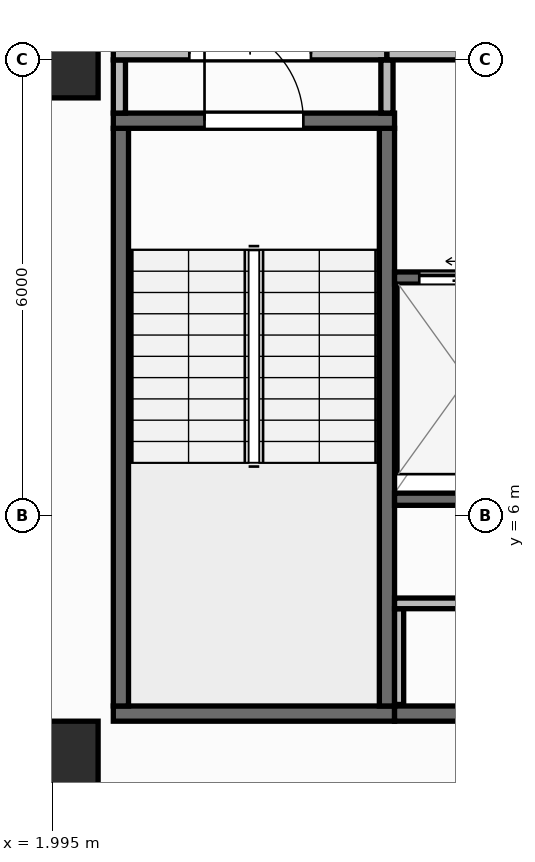
"""IFC4 building model, lengths in metres.
Left out: names, types, materials, properties, quantities, classifications, styles, units other than length and angle.
Written with IfcOpenShell. Run it as: python <this file> out.ifc"""

import sys

from ifc_helpers import new_model, si_unit, direction, frame, frame_2d, origin, origin_2d, place, context, subcontext, project, spatial, rectangle, extrude, element, fill, save


model = new_model("IFC4")
c1 = context("Model", 3, precision=1e-05, world=origin(), true_north=direction((0.0, 1.0)))
c2 = subcontext(c1, "Body", "Model", "MODEL_VIEW")
j1 = project(units=[si_unit("LENGTHUNIT", "METRE"), si_unit("PLANEANGLEUNIT", "RADIAN")], contexts=[c1])
p1 = place(None, origin())
s1 = spatial("IfcSite", under=j1, at=p1, CompositionType="ELEMENT")
p2 = place(p1, origin())
s2 = spatial("IfcBuilding", under=s1, at=p2, CompositionType="ELEMENT")
p3 = place(p2, frame((0.0, 0.0, 188.15)))
s3 = spatial("IfcBuildingStorey", under=s2, at=p3, CompositionType="ELEMENT", Elevation=188.15)
for number, where, z_axis, x_axis in (
    (1, (2.1, 2.8, 0.0), (0.0, 0.0, 1.0), (1.0, 0.0, 0.0)),
    (2, (2.1, 12.0, 0.0), (0.0, 0.0, 1.0), (1.0, 0.0, 0.0)),
):
    element("IfcColumn", number, at=place(p3, frame(where, z_axis=z_axis, x_axis=x_axis)), inside=s3, PredefinedType="COLUMN", context=c2, shape_type="SweptSolid", body=[
        extrude(rectangle(XDim=1.0, YDim=1.0, at=origin_2d()), origin(), (0.0, 0.0, 1.0), 3.95),
    ])
p4 = place(p3, frame((2.66, 0.174, 0.0), z_axis=(0.0, 0.0, 1.0), x_axis=(0.996634028439, 0.081979347142, 0.0)))
e3 = element("IfcWall", 3, at=p4, inside=s3, PredefinedType="STANDARD", context=c2, shape_type="SweptSolid", body=[
    extrude(rectangle(XDim=46.035, YDim=0.26, at=frame_2d((23.018, 0.0))), origin(), (0.0, 0.0, 1.0), 3.71),
])
p5 = place(p4, frame((21.817, 0.0, 0.9)))
e4 = element("IfcOpeningElement", 4, at=p5, cuts=e3, PredefinedType="OPENING", context=c2, shape_type="SweptSolid", body=[
    extrude(rectangle(XDim=2.4, YDim=1.65, at=frame_2d((1.2, 0.825))), frame((0.0, 0.14, 0.0), z_axis=(0.0, -1.0, 0.0), x_axis=(1.0, 0.0, 0.0)), (0.0, 0.0, 1.0), 0.28),
])
p6 = place(p3, frame((2.8, 3.4, 0.0), z_axis=(0.0, 0.0, 1.0), x_axis=(1.0, 0.0, 0.0)))
e5 = element("IfcWall", 5, at=p6, inside=s3, PredefinedType="SHEAR", context=c2, shape_type="SweptSolid", body=[
    extrude(rectangle(XDim=3.7, YDim=0.2, at=frame_2d((1.85, 0.0))), origin(), (0.0, 0.0, 1.0), 3.71),
])
for number, where, z_axis, x_axis in (
    (6, (2.9, 3.5, 0.0), (0.0, 0.0, 1.0), (0.0, 1.0, 0.0)),
    (7, (6.4, 3.5, 0.0), (0.0, 0.0, 1.0), (0.0, 1.0, 0.0)),
):
    element("IfcWall", number, at=place(p3, frame(where, z_axis=z_axis, x_axis=x_axis)), inside=s3, PredefinedType="SHEAR", context=c2, shape_type="SweptSolid", body=[
        extrude(rectangle(XDim=7.6, YDim=0.2, at=frame_2d((3.8, 0.0))), origin(), (0.0, 0.0, 1.0), 3.71),
    ])
p7 = place(p3, frame((2.8, 11.2, 0.0), z_axis=(0.0, 0.0, 1.0), x_axis=(1.0, 0.0, 0.0)))
e8 = element("IfcWall", 8, at=p7, inside=s3, PredefinedType="SHEAR", context=c2, shape_type="SweptSolid", body=[
    extrude(rectangle(XDim=3.7, YDim=0.2, at=frame_2d((1.85, 0.0))), origin(), (0.0, 0.0, 1.0), 3.71),
])
p8 = place(p7, frame((1.2, 0.0, 0.0)))
e9 = element("IfcOpeningElement", 9, at=p8, cuts=e8, PredefinedType="OPENING", context=c2, shape_type="SweptSolid", body=[
    extrude(rectangle(XDim=1.3, YDim=2.15, at=frame_2d((0.65, 1.075))), frame((0.0, 0.11, 0.0), z_axis=(0.0, -1.0, 0.0), x_axis=(1.0, 0.0, 0.0)), (0.0, 0.0, 1.0), 0.22),
])
p9 = place(p3, frame((6.5, 3.4, 0.0), z_axis=(0.0, 0.0, 1.0), x_axis=(1.0, 0.0, 0.0)))
e10 = element("IfcWall", 10, at=p9, inside=s3, PredefinedType="SHEAR", context=c2, shape_type="SweptSolid", body=[
    extrude(rectangle(XDim=13.7, YDim=0.2, at=frame_2d((6.85, 0.0))), origin(), (0.0, 0.0, 1.0), 3.71),
])
p10 = place(p3, frame((6.5, 6.22, 0.0), z_axis=(0.0, 0.0, 1.0), x_axis=(1.0, 0.0, 0.0)))
e11 = element("IfcWall", 11, at=p10, inside=s3, PredefinedType="SHEAR", context=c2, shape_type="SweptSolid", body=[
    extrude(rectangle(XDim=12.11, YDim=0.16, at=frame_2d((6.055, 0.0))), origin(), (0.0, 0.0, 1.0), 3.71),
])
p11 = place(p3, frame((6.5, 9.13, 0.0), z_axis=(0.0, 0.0, 1.0), x_axis=(1.0, 0.0, 0.0)))
e12 = element("IfcWall", 12, at=p11, inside=s3, PredefinedType="SHEAR", context=c2, shape_type="SweptSolid", body=[
    extrude(rectangle(XDim=1.975, YDim=0.16, at=frame_2d((0.988, 0.0))), origin(), (0.0, 0.0, 1.0), 3.71),
])
p12 = place(p11, frame((0.325, 0.0, 0.0)))
e13 = element("IfcOpeningElement", 13, at=p12, cuts=e12, PredefinedType="OPENING", context=c2, shape_type="SweptSolid", body=[
    extrude(rectangle(XDim=1.25, YDim=2.15, at=frame_2d((0.625, 1.075))), frame((0.0, 0.09, 0.0), z_axis=(0.0, -1.0, 0.0), x_axis=(1.0, 0.0, 0.0)), (0.0, 0.0, 1.0), 0.18),
])
p13 = place(p3, frame((6.56, 3.52, 0.0), z_axis=(0.0, 0.0, 1.0), x_axis=(0.0, 1.0, 0.0)))
e14 = element("IfcWall", 14, at=p13, inside=s3, PredefinedType="PARTITIONING", context=c2, shape_type="SweptSolid", body=[
    extrude(rectangle(XDim=1.26, YDim=0.12, at=frame_2d((0.63, 0.0))), origin(), (0.0, 0.0, 1.0), 3.71),
])
p14 = place(p3, frame((6.5, 4.85, 0.0), z_axis=(0.0, 0.0, 1.0), x_axis=(1.0, 0.0, 0.0)))
e15 = element("IfcWall", 15, at=p14, inside=s3, PredefinedType="PARTITIONING", context=c2, shape_type="SweptSolid", body=[
    extrude(rectangle(XDim=5.67, YDim=0.14, at=frame_2d((2.835, 0.0))), origin(), (0.0, 0.0, 1.0), 3.71),
])
p15 = place(p14, frame((2.285, 0.0, 0.0)))
e16 = element("IfcOpeningElement", 16, at=p15, cuts=e15, PredefinedType="OPENING", context=c2, shape_type="SweptSolid", body=[
    extrude(rectangle(XDim=1.1, YDim=2.1, at=frame_2d((0.55, 1.05))), frame((0.0, 0.08, 0.0), z_axis=(0.0, -1.0, 0.0), x_axis=(1.0, 0.0, 0.0)), (0.0, 0.0, 1.0), 0.16),
])
p16 = place(p3, frame((2.88, 11.3, 0.0), z_axis=(0.0, 0.0, 1.0), x_axis=(0.0, 1.0, 0.0)))
e17 = element("IfcWall", 17, at=p16, inside=s3, PredefinedType="PARTITIONING", context=c2, shape_type="SweptSolid", body=[
    extrude(rectangle(XDim=0.7, YDim=0.16, at=frame_2d((0.35, 0.0))), origin(), (0.0, 0.0, 1.0), 3.71),
])
p17 = place(p3, frame((2.8, 12.08, 0.0), z_axis=(0.0, 0.0, 1.0), x_axis=(1.0, 0.0, 0.0)))
e18 = element("IfcWall", 18, at=p17, inside=s3, PredefinedType="PARTITIONING", context=c2, shape_type="SweptSolid", body=[
    extrude(rectangle(XDim=3.6, YDim=0.16, at=frame_2d((1.8, 0.0))), origin(), (0.0, 0.0, 1.0), 3.152),
])
p18 = place(p17, frame((1.0, 0.0, 0.0)))
e19 = element("IfcOpeningElement", 19, at=p18, cuts=e18, PredefinedType="OPENING", context=c2, shape_type="SweptSolid", body=[
    extrude(rectangle(XDim=1.6, YDim=2.05, at=frame_2d((0.8, 1.025))), frame((0.0, 0.09, 0.0), z_axis=(0.0, -1.0, 0.0), x_axis=(1.0, 0.0, 0.0)), (0.0, 0.0, 1.0), 0.18),
])
p19 = place(p3, frame((6.4, 11.3, 0.0), z_axis=(0.0, 0.0, 1.0), x_axis=(0.0, 1.0, 0.0)))
e20 = element("IfcWall", 20, at=p19, inside=s3, PredefinedType="PARTITIONING", context=c2, shape_type="SweptSolid", body=[
    extrude(rectangle(XDim=0.7, YDim=0.16, at=frame_2d((0.35, 0.0))), origin(), (0.0, 0.0, 1.0), 3.71),
])
p20 = place(p3, frame((6.4, 12.08, 0.0), z_axis=(0.0, 0.0, 1.0), x_axis=(1.0, 0.0, 0.0)))
e21 = element("IfcWall", 21, at=p20, inside=s3, PredefinedType="PARTITIONING", context=c2, shape_type="SweptSolid", body=[
    extrude(rectangle(XDim=6.18, YDim=0.16, at=frame_2d((3.09, 0.0))), origin(), (0.0, 0.0, 1.0), 3.152),
])
p21 = place(p20, frame((2.29, 0.0, 0.0)))
e22 = element("IfcOpeningElement", 22, at=p21, cuts=e21, PredefinedType="OPENING", context=c2, shape_type="SweptSolid", body=[
    extrude(rectangle(XDim=1.6, YDim=2.05, at=frame_2d((0.8, 1.025))), frame((0.0, 0.09, 0.0), z_axis=(0.0, -1.0, 0.0), x_axis=(1.0, 0.0, 0.0)), (0.0, 0.0, 1.0), 0.18),
])
p22 = place(p8, origin())
e23 = element("IfcDoor", 23, at=p22, inside=s3, OperationType="SINGLE_SWING_LEFT", PredefinedType="DOOR", context=c2, shape_type="SweptSolid", body=[
    extrude(rectangle(XDim=1.3, YDim=2.15, at=frame_2d((0.65, 1.075))), frame((0.0, 0.025, 0.0), z_axis=(0.0, -1.0, 0.0), x_axis=(1.0, 0.0, 0.0)), (0.0, 0.0, 1.0), 0.05),
])
fill(e9, e23)
p23 = place(p12, origin())
e24 = element("IfcDoor", 24, at=p23, inside=s3, OperationType="SLIDING_TO_LEFT", PredefinedType="DOOR", context=c2, shape_type="SweptSolid", body=[
    extrude(rectangle(XDim=1.25, YDim=2.15, at=frame_2d((0.625, 1.075))), frame((0.0, 0.025, 0.0), z_axis=(0.0, -1.0, 0.0), x_axis=(1.0, 0.0, 0.0)), (0.0, 0.0, 1.0), 0.05),
])
fill(e13, e24)
p24 = place(p18, origin())
e25 = element("IfcDoor", 25, at=p24, inside=s3, OperationType="DOUBLE_DOOR_SINGLE_SWING", PredefinedType="DOOR", context=c2, shape_type="SweptSolid", body=[
    extrude(rectangle(XDim=1.6, YDim=2.05, at=frame_2d((0.8, 1.025))), frame((0.0, 0.025, 0.0), z_axis=(0.0, -1.0, 0.0), x_axis=(1.0, 0.0, 0.0)), (0.0, 0.0, 1.0), 0.05),
])
fill(e19, e25)
save(model, sys.argv[1])
